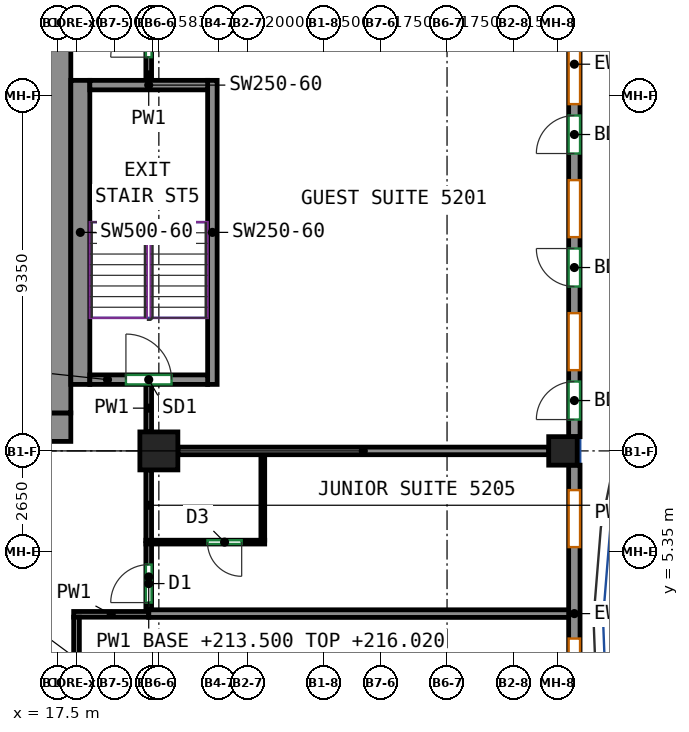
"""IFC4 building model, lengths in metres.
Left out: names, types, materials, properties, quantities, classifications, styles, units other than length and angle.
Written with IfcOpenShell. Run it as: python <this file> out.ifc"""

import sys

from ifc_helpers import new_model, si_unit, direction, frame, frame_2d, origin, origin_2d, place, context, subcontext, project, spatial, rectangle, extrude, source, transform, mapped, element, fill, save


model = new_model("IFC4")
c1 = context("Model", 3, precision=1e-05, world=origin(), true_north=direction((0.0, 1.0)))
c2 = subcontext(c1, "Body", "Model", "MODEL_VIEW")
j1 = project(units=[si_unit("LENGTHUNIT", "METRE"), si_unit("PLANEANGLEUNIT", "RADIAN")], contexts=[c1])
p1 = place(None, origin())
s1 = spatial("IfcSite", under=j1, at=p1, CompositionType="ELEMENT")
p2 = place(p1, origin())
s2 = spatial("IfcBuilding", under=s1, at=p2, CompositionType="ELEMENT")
p3 = place(p2, frame((0.0, 0.0, 213.5)))
s3 = spatial("IfcBuildingStorey", under=s2, at=p3, CompositionType="ELEMENT", Elevation=213.5)
m1 = source(origin(), c2, "Body", "SweptSolid", [
    extrude(rectangle(XDim=1.0, YDim=1.0, at=origin_2d()), origin(), (0.0, 0.0, 1.0), 3.12),
])
p4 = place(p3, frame((20.167, 8.0, 0.0), z_axis=(0.0, 0.0, 1.0), x_axis=(1.0, 0.0, 0.0)))
e1 = element("IfcColumn", 1, at=p4, inside=s3, PredefinedType="COLUMN", context=c2, shape_type="MappedRepresentation", body=[
    mapped(m1, transform((0.0, 0.0, 0.0))),
])
m2 = source(origin(), c2, "Body", "SweptSolid", [
    extrude(rectangle(XDim=0.75, YDim=0.75, at=origin_2d()), origin(), (0.0, 0.0, 1.0), 3.12),
])
p5 = place(p3, frame((30.8, 8.0, 0.0), z_axis=(0.0, 0.0, 1.0), x_axis=(1.0, 0.0, 0.0)))
e2 = element("IfcColumn", 2, at=p5, inside=s3, PredefinedType="COLUMN", context=c2, shape_type="MappedRepresentation", body=[
    mapped(m2, transform((0.0, 0.0, 0.0))),
])
m3 = source(origin(), c2, "Body", "SweptSolid", [
    extrude(rectangle(XDim=5.38, YDim=0.75, at=frame_2d((2.69, 0.0))), origin(), (0.0, 0.0, 1.0), 3.12),
])
p6 = place(p3, frame((12.47, 8.625, 0.0), z_axis=(0.0, 0.0, 1.0), x_axis=(1.0, 0.0, 0.0)))
e3 = element("IfcWall", 3, at=p6, inside=s3, PredefinedType="SHEAR", context=c2, shape_type="MappedRepresentation", body=[
    mapped(m3, transform((0.0, 0.0, 0.0))),
])
p7 = place(p6, frame((2.18, 0.0, 0.0)))
e4 = element("IfcOpeningElement", 4, at=p7, cuts=e3, PredefinedType="OPENING", context=c2, shape_type="SweptSolid", body=[
    extrude(rectangle(XDim=1.2, YDim=2.1, at=frame_2d((0.6, 1.05))), frame((0.0, 0.385, 0.0), z_axis=(0.0, -1.0, 0.0), x_axis=(1.0, 0.0, 0.0)), (0.0, 0.0, 1.0), 0.77),
])
m4 = source(origin(), c2, "Body", "SweptSolid", [
    extrude(rectangle(XDim=12.0, YDim=0.75, at=frame_2d((6.0, 0.0))), origin(), (0.0, 0.0, 1.0), 3.12),
])
p8 = place(p3, frame((17.475, 9.0, 0.0), z_axis=(0.0, 0.0, 1.0), x_axis=(0.0, 1.0, 0.0)))
e5 = element("IfcWall", 5, at=p8, inside=s3, PredefinedType="SHEAR", context=c2, shape_type="MappedRepresentation", body=[
    mapped(m4, transform((0.0, 0.0, 0.0))),
])
m5 = source(origin(), c2, "Body", "SweptSolid", [
    extrude(rectangle(XDim=8.0, YDim=0.5, at=frame_2d((4.0, 0.0))), origin(), (0.0, 0.0, 1.0), 3.12),
])
p9 = place(p3, frame((18.1, 9.75, 0.0), z_axis=(0.0, 0.0, 1.0), x_axis=(0.0, 1.0, 0.0)))
e6 = element("IfcWall", 6, at=p9, inside=s3, PredefinedType="SHEAR", context=c2, shape_type="MappedRepresentation", body=[
    mapped(m5, transform((0.0, 0.0, 0.0))),
])
m6 = source(origin(), c2, "Body", "SweptSolid", [
    extrude(rectangle(XDim=8.0, YDim=0.25, at=frame_2d((4.0, 0.0))), origin(), (0.0, 0.0, 1.0), 3.12),
])
p10 = place(p3, frame((21.575, 9.75, 0.0), z_axis=(0.0, 0.0, 1.0), x_axis=(0.0, 1.0, 0.0)))
e7 = element("IfcWall", 7, at=p10, inside=s3, PredefinedType="SHEAR", context=c2, shape_type="MappedRepresentation", body=[
    mapped(m6, transform((0.0, 0.0, 0.0))),
])
m7 = source(origin(), c2, "Body", "SweptSolid", [
    extrude(rectangle(XDim=3.1, YDim=0.25, at=frame_2d((1.55, 0.0))), origin(), (0.0, 0.0, 1.0), 3.12),
])
p11 = place(p3, frame((18.35, 9.875, 0.0), z_axis=(0.0, 0.0, 1.0), x_axis=(1.0, 0.0, 0.0)))
e8 = element("IfcWall", 8, at=p11, inside=s3, PredefinedType="SHEAR", context=c2, shape_type="MappedRepresentation", body=[
    mapped(m7, transform((0.0, 0.0, 0.0))),
])
p12 = place(p11, frame((0.95, 0.0, 0.0)))
e9 = element("IfcOpeningElement", 9, at=p12, cuts=e8, PredefinedType="OPENING", context=c2, shape_type="SweptSolid", body=[
    extrude(rectangle(XDim=1.2, YDim=2.1, at=frame_2d((0.6, 1.05))), frame((0.0, 0.135, 0.0), z_axis=(0.0, -1.0, 0.0), x_axis=(1.0, 0.0, 0.0)), (0.0, 0.0, 1.0), 0.27),
])
p13 = place(p3, frame((18.35, 17.625, 0.0), z_axis=(0.0, 0.0, 1.0), x_axis=(1.0, 0.0, 0.0)))
e10 = element("IfcWall", 10, at=p13, inside=s3, PredefinedType="SHEAR", context=c2, shape_type="MappedRepresentation", body=[
    mapped(m7, transform((0.0, 0.0, 0.0))),
])
m8 = source(origin(), c2, "Body", "SweptSolid", [
    extrude(rectangle(XDim=7.812, YDim=0.3, at=frame_2d((3.906, 0.0))), origin(), (0.0, 0.0, 1.0), 3.12),
])
p14 = place(p3, frame((31.1, -0.188, 0.0), z_axis=(0.0, 0.0, 1.0), x_axis=(0.0, 1.0, 0.0)))
e11 = element("IfcWall", 11, at=p14, inside=s3, PredefinedType="SOLIDWALL", context=c2, shape_type="MappedRepresentation", body=[
    mapped(m8, transform((0.0, 0.0, 0.0))),
])
p15 = place(p14, frame((1.75, 0.0, 0.85)))
e12 = element("IfcOpeningElement", 12, at=p15, cuts=e11, PredefinedType="OPENING", context=c2, shape_type="SweptSolid", body=[
    extrude(rectangle(XDim=1.5, YDim=1.95, at=frame_2d((0.75, 0.975))), frame((0.0, 0.16, 0.0), z_axis=(0.0, -1.0, 0.0), x_axis=(1.0, 0.0, 0.0)), (0.0, 0.0, 1.0), 0.32),
])
p16 = place(p14, frame((5.656, 0.0, 0.85)))
e13 = element("IfcOpeningElement", 13, at=p16, cuts=e11, PredefinedType="OPENING", context=c2, shape_type="SweptSolid", body=[
    extrude(rectangle(XDim=1.5, YDim=1.95, at=frame_2d((0.75, 0.975))), frame((0.0, 0.16, 0.0), z_axis=(0.0, -1.0, 0.0), x_axis=(1.0, 0.0, 0.0)), (0.0, 0.0, 1.0), 0.32),
])
m9 = source(origin(), c2, "Body", "SweptSolid", [
    extrude(rectangle(XDim=14.0, YDim=0.3, at=frame_2d((7.0, 0.0))), origin(), (0.0, 0.0, 1.0), 3.12),
])
p17 = place(p3, frame((31.1, 8.375, 0.0), z_axis=(0.0, 0.0, 1.0), x_axis=(0.0, 1.0, 0.0)))
e14 = element("IfcWall", 14, at=p17, inside=s3, PredefinedType="SOLIDWALL", context=c2, shape_type="MappedRepresentation", body=[
    mapped(m9, transform((0.0, 0.0, 0.0))),
])
p18 = place(p17, frame((1.75, 0.0, 0.85)))
e15 = element("IfcOpeningElement", 15, at=p18, cuts=e14, PredefinedType="OPENING", context=c2, shape_type="SweptSolid", body=[
    extrude(rectangle(XDim=1.5, YDim=1.95, at=frame_2d((0.75, 0.975))), frame((0.0, 0.16, 0.0), z_axis=(0.0, -1.0, 0.0), x_axis=(1.0, 0.0, 0.0)), (0.0, 0.0, 1.0), 0.32),
])
p19 = place(p17, frame((0.45, 0.0, 0.0)))
e16 = element("IfcOpeningElement", 16, at=p19, cuts=e14, PredefinedType="OPENING", context=c2, shape_type="SweptSolid", body=[
    extrude(rectangle(XDim=1.0, YDim=2.1, at=frame_2d((0.5, 1.05))), frame((0.0, 0.16, 0.0), z_axis=(0.0, -1.0, 0.0), x_axis=(1.0, 0.0, 0.0)), (0.0, 0.0, 1.0), 0.32),
])
p20 = place(p17, frame((5.25, 0.0, 0.85)))
e17 = element("IfcOpeningElement", 17, at=p20, cuts=e14, PredefinedType="OPENING", context=c2, shape_type="SweptSolid", body=[
    extrude(rectangle(XDim=1.5, YDim=1.95, at=frame_2d((0.75, 0.975))), frame((0.0, 0.16, 0.0), z_axis=(0.0, -1.0, 0.0), x_axis=(1.0, 0.0, 0.0)), (0.0, 0.0, 1.0), 0.32),
])
p21 = place(p17, frame((3.95, 0.0, 0.0)))
e18 = element("IfcOpeningElement", 18, at=p21, cuts=e14, PredefinedType="OPENING", context=c2, shape_type="SweptSolid", body=[
    extrude(rectangle(XDim=1.0, YDim=2.1, at=frame_2d((0.5, 1.05))), frame((0.0, 0.16, 0.0), z_axis=(0.0, -1.0, 0.0), x_axis=(1.0, 0.0, 0.0)), (0.0, 0.0, 1.0), 0.32),
])
p22 = place(p17, frame((8.75, 0.0, 0.85)))
e19 = element("IfcOpeningElement", 19, at=p22, cuts=e14, PredefinedType="OPENING", context=c2, shape_type="SweptSolid", body=[
    extrude(rectangle(XDim=1.5, YDim=1.95, at=frame_2d((0.75, 0.975))), frame((0.0, 0.16, 0.0), z_axis=(0.0, -1.0, 0.0), x_axis=(1.0, 0.0, 0.0)), (0.0, 0.0, 1.0), 0.32),
])
p23 = place(p17, frame((7.45, 0.0, 0.0)))
e20 = element("IfcOpeningElement", 20, at=p23, cuts=e14, PredefinedType="OPENING", context=c2, shape_type="SweptSolid", body=[
    extrude(rectangle(XDim=1.0, YDim=2.1, at=frame_2d((0.5, 1.05))), frame((0.0, 0.16, 0.0), z_axis=(0.0, -1.0, 0.0), x_axis=(1.0, 0.0, 0.0)), (0.0, 0.0, 1.0), 0.32),
])
p24 = place(p17, frame((12.25, 0.0, 0.85)))
e21 = element("IfcOpeningElement", 21, at=p24, cuts=e14, PredefinedType="OPENING", context=c2, shape_type="SweptSolid", body=[
    extrude(rectangle(XDim=1.5, YDim=1.95, at=frame_2d((0.75, 0.975))), frame((0.0, 0.16, 0.0), z_axis=(0.0, -1.0, 0.0), x_axis=(1.0, 0.0, 0.0)), (0.0, 0.0, 1.0), 0.32),
])
p25 = place(p17, frame((10.95, 0.0, 0.0)))
e22 = element("IfcOpeningElement", 22, at=p25, cuts=e14, PredefinedType="OPENING", context=c2, shape_type="SweptSolid", body=[
    extrude(rectangle(XDim=1.0, YDim=2.1, at=frame_2d((0.5, 1.05))), frame((0.0, 0.16, 0.0), z_axis=(0.0, -1.0, 0.0), x_axis=(1.0, 0.0, 0.0)), (0.0, 0.0, 1.0), 0.32),
])
p26 = place(p3, frame((19.9, 3.809, 0.0), z_axis=(0.0, 0.0, 1.0), x_axis=(0.0, 1.0, 0.0)))
e23 = element("IfcWall", 23, at=p26, inside=s3, PredefinedType="PARTITIONING", context=c2, shape_type="SweptSolid", body=[
    extrude(rectangle(XDim=1.751, YDim=0.15, at=frame_2d((0.875, 0.0))), origin(), (0.0, 0.0, 1.0), 2.52),
])
p27 = place(p26, frame((0.2, 0.0, 0.0)))
e24 = element("IfcOpeningElement", 24, at=p27, cuts=e23, PredefinedType="OPENING", context=c2, shape_type="SweptSolid", body=[
    extrude(rectangle(XDim=1.0, YDim=2.1, at=frame_2d((0.5, 1.05))), frame((0.0, 0.085, 0.0), z_axis=(0.0, -1.0, 0.0), x_axis=(1.0, 0.0, 0.0)), (0.0, 0.0, 1.0), 0.17),
])
p28 = place(p3, frame((19.9, 5.64, 0.0), z_axis=(0.0, 0.0, 1.0), x_axis=(0.0, 1.0, 0.0)))
e25 = element("IfcWall", 25, at=p28, inside=s3, PredefinedType="PARTITIONING", context=c2, shape_type="SweptSolid", body=[
    extrude(rectangle(XDim=1.86, YDim=0.15, at=frame_2d((0.93, 0.0))), origin(), (0.0, 0.0, 1.0), 2.52),
])
p29 = place(p3, frame((19.9, 17.75, 0.0), z_axis=(0.0, 0.0, 1.0), x_axis=(0.0, 1.0, 0.0)))
e26 = element("IfcWall", 26, at=p29, inside=s3, PredefinedType="PARTITIONING", context=c2, shape_type="SweptSolid", body=[
    extrude(rectangle(XDim=1.81, YDim=0.15, at=frame_2d((0.905, 0.0))), origin(), (0.0, 0.0, 1.0), 3.12),
])
p30 = place(p29, frame((0.61, 0.0, 0.0)))
e27 = element("IfcOpeningElement", 27, at=p30, cuts=e26, PredefinedType="OPENING", context=c2, shape_type="SweptSolid", body=[
    extrude(rectangle(XDim=1.0, YDim=2.1, at=frame_2d((0.5, 1.05))), frame((0.0, 0.085, 0.0), z_axis=(0.0, -1.0, 0.0), x_axis=(1.0, 0.0, 0.0)), (0.0, 0.0, 1.0), 0.17),
])
p31 = place(p3, frame((19.9, 8.5, 0.0), z_axis=(0.0, 0.0, 1.0), x_axis=(0.0, 1.0, 0.0)))
e28 = element("IfcWall", 28, at=p31, inside=s3, PredefinedType="PARTITIONING", context=c2, shape_type="SweptSolid", body=[
    extrude(rectangle(XDim=1.25, YDim=0.15, at=frame_2d((0.625, 0.0))), origin(), (0.0, 0.0, 1.0), 3.12),
])
p32 = place(p3, frame((17.925, 3.7, 0.0), z_axis=(0.0, 0.0, 1.0), x_axis=(1.0, 0.0, 0.0)))
e29 = element("IfcWall", 29, at=p32, inside=s3, PredefinedType="PARTITIONING", context=c2, shape_type="SweptSolid", body=[
    extrude(rectangle(XDim=1.975, YDim=0.15, at=frame_2d((0.987, 0.0))), origin(), (0.0, 0.0, 1.0), 3.12),
])
p33 = place(p3, frame((18.0, -4.725, 0.0), z_axis=(0.0, 0.0, 1.0), x_axis=(0.0, 1.0, 0.0)))
e30 = element("IfcWall", 30, at=p33, inside=s3, PredefinedType="PARTITIONING", context=c2, shape_type="SweptSolid", body=[
    extrude(rectangle(XDim=8.35, YDim=0.15, at=frame_2d((4.175, 0.0))), origin(), (0.0, 0.0, 1.0), 3.12),
])
p34 = place(p33, frame((2.919, 0.0, 0.0)))
e31 = element("IfcOpeningElement", 31, at=p34, cuts=e30, PredefinedType="OPENING", context=c2, shape_type="SweptSolid", body=[
    extrude(rectangle(XDim=0.9, YDim=2.1, at=frame_2d((0.45, 1.05))), frame((0.0, 0.085, 0.0), z_axis=(0.0, -1.0, 0.0), x_axis=(1.0, 0.0, 0.0)), (0.0, 0.0, 1.0), 0.17),
])
p35 = place(p3, frame((22.952, 5.6, 0.0), z_axis=(0.0, 0.0, 1.0), x_axis=(-1.0, 0.0, 0.0)))
e32 = element("IfcWall", 32, at=p35, inside=s3, PredefinedType="PARTITIONING", context=c2, shape_type="SweptSolid", body=[
    extrude(rectangle(XDim=3.125, YDim=0.1, at=frame_2d((1.562, 0.0))), origin(), (0.0, 0.0, 1.0), 3.12),
])
p36 = place(p35, frame((0.606, 0.0, 0.0)))
e33 = element("IfcOpeningElement", 33, at=p36, cuts=e32, PredefinedType="OPENING", context=c2, shape_type="SweptSolid", body=[
    extrude(rectangle(XDim=0.9, YDim=2.1, at=frame_2d((0.45, 1.05))), frame((0.0, 0.06, 0.0), z_axis=(0.0, -1.0, 0.0), x_axis=(1.0, 0.0, 0.0)), (0.0, 0.0, 1.0), 0.12),
])
p37 = place(p3, frame((22.902, 5.65, 0.0), z_axis=(0.0, 0.0, 1.0), x_axis=(0.0, 1.0, 0.0)))
e34 = element("IfcWall", 34, at=p37, inside=s3, PredefinedType="PARTITIONING", context=c2, shape_type="SweptSolid", body=[
    extrude(rectangle(XDim=2.25, YDim=0.1, at=frame_2d((1.125, 0.0))), origin(), (0.0, 0.0, 1.0), 3.12),
])
p38 = place(p3, frame((19.902, 3.719, 0.0), z_axis=(0.0, 0.0, 1.0), x_axis=(1.0, 0.0, 0.0)))
e35 = element("IfcWall", 35, at=p38, inside=s3, PredefinedType="PARTITIONING", context=c2, shape_type="SweptSolid", body=[
    extrude(rectangle(XDim=11.098, YDim=0.2, at=frame_2d((5.549, 0.0))), origin(), (0.0, 0.0, 1.0), 3.12),
])
p39 = place(p3, frame((20.667, 8.0, 0.0), z_axis=(0.0, 0.0, 1.0), x_axis=(1.0, 0.0, 0.0)))
e36 = element("IfcWall", 36, at=p39, inside=s3, PredefinedType="PARTITIONING", context=c2, shape_type="SweptSolid", body=[
    extrude(rectangle(XDim=9.758, YDim=0.2, at=frame_2d((4.879, 0.0))), origin(), (0.0, 0.0, 1.0), 2.52),
])
p40 = place(p15, origin())
e37 = element("IfcWindow", 37, at=p40, inside=s3, PartitioningType="SINGLE_PANEL", PredefinedType="WINDOW", context=c2, shape_type="SweptSolid", body=[
    extrude(rectangle(XDim=1.5, YDim=1.95, at=frame_2d((0.75, 0.975))), frame((0.0, 0.03, 0.0), z_axis=(0.0, -1.0, 0.0), x_axis=(1.0, 0.0, 0.0)), (0.0, 0.0, 1.0), 0.06),
])
fill(e12, e37)
p41 = place(p16, origin())
e38 = element("IfcWindow", 38, at=p41, inside=s3, PartitioningType="SINGLE_PANEL", PredefinedType="WINDOW", context=c2, shape_type="SweptSolid", body=[
    extrude(rectangle(XDim=1.5, YDim=1.95, at=frame_2d((0.75, 0.975))), frame((0.0, 0.03, 0.0), z_axis=(0.0, -1.0, 0.0), x_axis=(1.0, 0.0, 0.0)), (0.0, 0.0, 1.0), 0.06),
])
fill(e13, e38)
p42 = place(p18, origin())
e39 = element("IfcWindow", 39, at=p42, inside=s3, PartitioningType="SINGLE_PANEL", PredefinedType="WINDOW", context=c2, shape_type="SweptSolid", body=[
    extrude(rectangle(XDim=1.5, YDim=1.95, at=frame_2d((0.75, 0.975))), frame((0.0, 0.03, 0.0), z_axis=(0.0, -1.0, 0.0), x_axis=(1.0, 0.0, 0.0)), (0.0, 0.0, 1.0), 0.06),
])
fill(e15, e39)
p43 = place(p19, origin())
e40 = element("IfcDoor", 40, at=p43, inside=s3, OperationType="SINGLE_SWING_LEFT", PredefinedType="DOOR", context=c2, shape_type="SweptSolid", body=[
    extrude(rectangle(XDim=1.0, YDim=2.1, at=frame_2d((0.5, 1.05))), frame((0.0, 0.025, 0.0), z_axis=(0.0, -1.0, 0.0), x_axis=(1.0, 0.0, 0.0)), (0.0, 0.0, 1.0), 0.05),
])
fill(e16, e40)
p44 = place(p20, origin())
e41 = element("IfcWindow", 41, at=p44, inside=s3, PartitioningType="SINGLE_PANEL", PredefinedType="WINDOW", context=c2, shape_type="SweptSolid", body=[
    extrude(rectangle(XDim=1.5, YDim=1.95, at=frame_2d((0.75, 0.975))), frame((0.0, 0.03, 0.0), z_axis=(0.0, -1.0, 0.0), x_axis=(1.0, 0.0, 0.0)), (0.0, 0.0, 1.0), 0.06),
])
fill(e17, e41)
p45 = place(p21, origin())
e42 = element("IfcDoor", 42, at=p45, inside=s3, OperationType="SINGLE_SWING_RIGHT", PredefinedType="DOOR", context=c2, shape_type="SweptSolid", body=[
    extrude(rectangle(XDim=1.0, YDim=2.1, at=frame_2d((0.5, 1.05))), frame((0.0, 0.025, 0.0), z_axis=(0.0, -1.0, 0.0), x_axis=(1.0, 0.0, 0.0)), (0.0, 0.0, 1.0), 0.05),
])
fill(e18, e42)
p46 = place(p22, origin())
e43 = element("IfcWindow", 43, at=p46, inside=s3, PartitioningType="SINGLE_PANEL", PredefinedType="WINDOW", context=c2, shape_type="SweptSolid", body=[
    extrude(rectangle(XDim=1.5, YDim=1.95, at=frame_2d((0.75, 0.975))), frame((0.0, 0.03, 0.0), z_axis=(0.0, -1.0, 0.0), x_axis=(1.0, 0.0, 0.0)), (0.0, 0.0, 1.0), 0.06),
])
fill(e19, e43)
p47 = place(p23, origin())
e44 = element("IfcDoor", 44, at=p47, inside=s3, OperationType="SINGLE_SWING_LEFT", PredefinedType="DOOR", context=c2, shape_type="SweptSolid", body=[
    extrude(rectangle(XDim=1.0, YDim=2.1, at=frame_2d((0.5, 1.05))), frame((0.0, 0.025, 0.0), z_axis=(0.0, -1.0, 0.0), x_axis=(1.0, 0.0, 0.0)), (0.0, 0.0, 1.0), 0.05),
])
fill(e20, e44)
p48 = place(p12, origin())
e45 = element("IfcDoor", 45, at=p48, inside=s3, OperationType="DOUBLE_DOOR_SINGLE_SWING", PredefinedType="DOOR", context=c2, shape_type="SweptSolid", body=[
    extrude(rectangle(XDim=1.2, YDim=2.1, at=frame_2d((0.6, 1.05))), frame((0.0, 0.025, 0.0), z_axis=(0.0, -1.0, 0.0), x_axis=(1.0, 0.0, 0.0)), (0.0, 0.0, 1.0), 0.05),
])
fill(e9, e45)
p49 = place(p27, origin())
e46 = element("IfcDoor", 46, at=p49, inside=s3, OperationType="SINGLE_SWING_LEFT", PredefinedType="DOOR", context=c2, shape_type="SweptSolid", body=[
    extrude(rectangle(XDim=1.0, YDim=2.1, at=frame_2d((0.5, 1.05))), frame((0.0, 0.025, 0.0), z_axis=(0.0, -1.0, 0.0), x_axis=(1.0, 0.0, 0.0)), (0.0, 0.0, 1.0), 0.05),
])
fill(e24, e46)
p50 = place(p36, origin())
e47 = element("IfcDoor", 47, at=p50, inside=s3, OperationType="SINGLE_SWING_LEFT", PredefinedType="DOOR", context=c2, shape_type="SweptSolid", body=[
    extrude(rectangle(XDim=0.9, YDim=2.1, at=frame_2d((0.45, 1.05))), frame((0.0, 0.025, 0.0), z_axis=(0.0, -1.0, 0.0), x_axis=(1.0, 0.0, 0.0)), (0.0, 0.0, 1.0), 0.05),
])
fill(e33, e47)
p51 = place(p30, origin())
e48 = element("IfcDoor", 48, at=p51, inside=s3, OperationType="SINGLE_SWING_LEFT", PredefinedType="DOOR", context=c2, shape_type="SweptSolid", body=[
    extrude(rectangle(XDim=1.0, YDim=2.1, at=frame_2d((0.5, 1.05))), frame((0.0, 0.025, 0.0), z_axis=(0.0, -1.0, 0.0), x_axis=(1.0, 0.0, 0.0)), (0.0, 0.0, 1.0), 0.05),
])
fill(e27, e48)
save(model, sys.argv[1])
